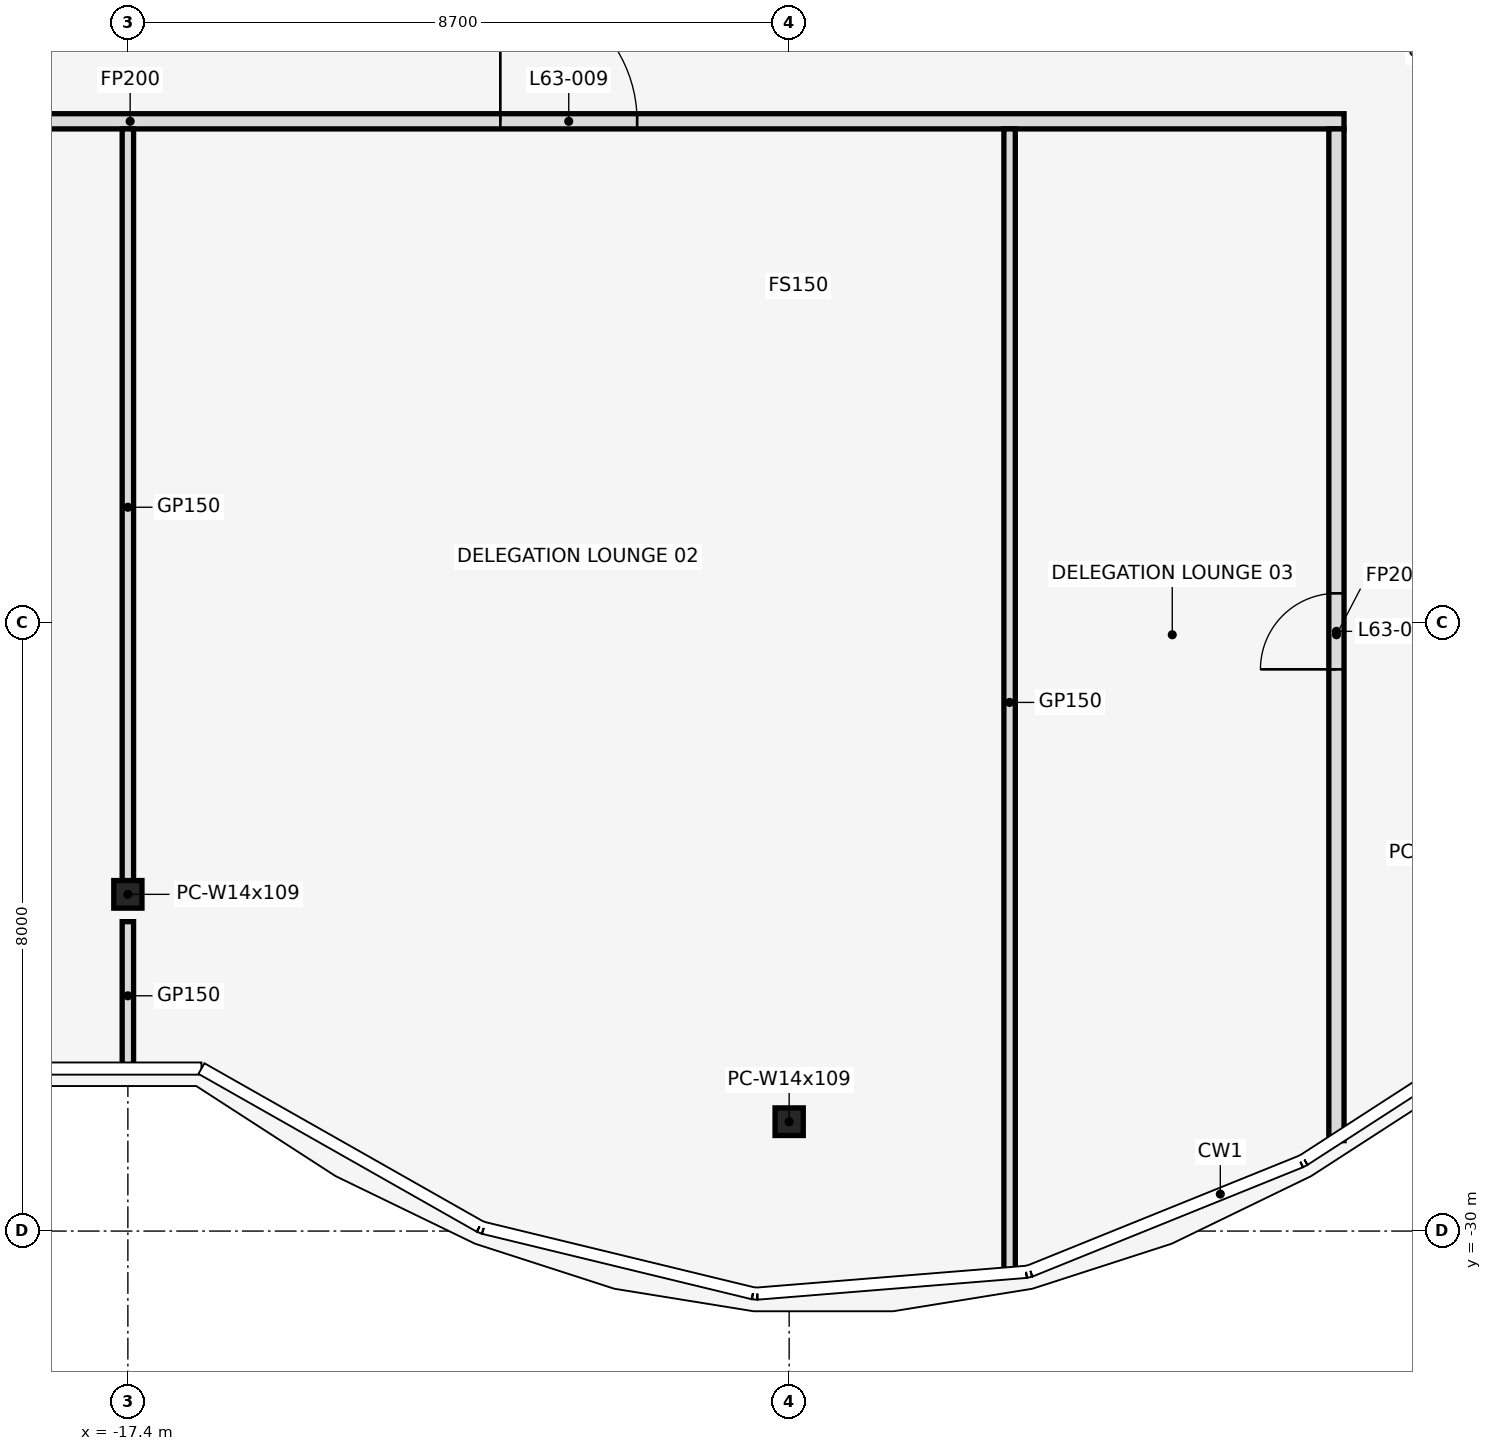
"""IFC4 building model, lengths in metres.
Left out: names, types, materials, properties, quantities, classifications, styles, units other than length and angle.
Written with IfcOpenShell. Run it as: python <this file> out.ifc"""

import sys

from ifc_helpers import new_model, si_unit, direction, frame, frame_2d, origin, origin_2d, place, context, subcontext, project, spatial, rectangle, i_section, extrude, element, fill, save


model = new_model("IFC4")
c1 = context("Model", 3, precision=1e-05, world=origin(), true_north=direction((0.0, 1.0)))
c2 = subcontext(c1, "Body", "Model", "MODEL_VIEW")
j1 = project(units=[si_unit("LENGTHUNIT", "METRE"), si_unit("PLANEANGLEUNIT", "RADIAN")], contexts=[c1])
p1 = place(None, origin())
s1 = spatial("IfcSite", under=j1, at=p1, CompositionType="ELEMENT")
p2 = place(p1, origin())
s2 = spatial("IfcBuilding", under=s1, at=p2, CompositionType="ELEMENT")
p3 = place(p2, frame((0.0, 0.0, 279.2)))
s3 = spatial("IfcBuildingStorey", under=s2, at=p3, CompositionType="ELEMENT", Elevation=279.2)
for number, where, z_axis, x_axis in (
    (1, (-17.4, -25.57, 0.0), (0.0, 0.0, 1.0), (1.0, 0.0, 0.0)),
    (2, (-8.7, -28.561, 0.0), (0.0, 0.0, 1.0), (1.0, 0.0, 0.0)),
):
    element("IfcColumn", number, at=place(p3, frame(where, z_axis=z_axis, x_axis=x_axis)), inside=s3, PredefinedType="COLUMN", context=c2, shape_type="SweptSolid", body=[
        extrude(i_section(OverallWidth=0.371, OverallDepth=0.363, WebThickness=0.013, FlangeThickness=0.022, at=origin_2d()), origin(), (0.0, 0.0, 1.0), 4.2),
    ])
p4 = place(p3, frame((-33.34, -15.4, 0.0), z_axis=(0.0, 0.0, 1.0), x_axis=(1.0, 0.0, 0.0)))
e3 = element("IfcWall", 3, at=p4, inside=s3, PredefinedType="PARTITIONING", context=c2, shape_type="SweptSolid", body=[
    extrude(rectangle(XDim=31.94, YDim=0.2, at=frame_2d((15.97, 0.0))), origin(), (0.0, 0.0, 1.0), 3.04),
])
p5 = place(p4, frame((4.2, 0.0, 0.0)))
e4 = element("IfcOpeningElement", 4, at=p5, cuts=e3, PredefinedType="OPENING", context=c2, shape_type="SweptSolid", body=[
    extrude(rectangle(XDim=1.8, YDim=2.1, at=frame_2d((0.9, 1.05))), frame((0.0, 0.112, 0.0), z_axis=(0.0, -1.0, 0.0), x_axis=(1.0, 0.0, 0.0)), (0.0, 0.0, 1.0), 0.224),
])
p6 = place(p4, frame((12.54, 0.0, 0.0)))
e5 = element("IfcOpeningElement", 5, at=p6, cuts=e3, PredefinedType="OPENING", context=c2, shape_type="SweptSolid", body=[
    extrude(rectangle(XDim=1.0, YDim=2.1, at=frame_2d((0.5, 1.05))), frame((0.0, 0.112, 0.0), z_axis=(0.0, -1.0, 0.0), x_axis=(1.0, 0.0, 0.0)), (0.0, 0.0, 1.0), 0.224),
])
p7 = place(p4, frame((20.84, 0.0, 0.0)))
e6 = element("IfcOpeningElement", 6, at=p7, cuts=e3, PredefinedType="OPENING", context=c2, shape_type="SweptSolid", body=[
    extrude(rectangle(XDim=1.8, YDim=2.1, at=frame_2d((0.9, 1.05))), frame((0.0, 0.112, 0.0), z_axis=(0.0, -1.0, 0.0), x_axis=(1.0, 0.0, 0.0)), (0.0, 0.0, 1.0), 0.224),
])
p8 = place(p3, frame((-17.4, -27.88, 0.0), z_axis=(0.0, 0.0, 1.0), x_axis=(0.0, 1.0, 0.0)))
e7 = element("IfcWall", 7, at=p8, inside=s3, PredefinedType="PARTITIONING", context=c2, shape_type="SweptSolid", body=[
    extrude(rectangle(XDim=1.951, YDim=0.15, at=frame_2d((0.975, 0.0))), origin(), (0.0, 0.0, 1.0), 3.04),
])
p9 = place(p3, frame((-17.4, -25.455, 0.0), z_axis=(0.0, 0.0, 1.0), x_axis=(0.0, 1.0, 0.0)))
e8 = element("IfcWall", 8, at=p9, inside=s3, PredefinedType="PARTITIONING", context=c2, shape_type="SweptSolid", body=[
    extrude(rectangle(XDim=9.955, YDim=0.15, at=frame_2d((4.977, 0.0))), origin(), (0.0, 0.0, 1.0), 3.04),
])
p10 = place(p3, frame((-5.8, -30.59, 0.0), z_axis=(0.0, 0.0, 1.0), x_axis=(0.0, 1.0, 0.0)))
e9 = element("IfcWall", 9, at=p10, inside=s3, PredefinedType="PARTITIONING", context=c2, shape_type="SweptSolid", body=[
    extrude(rectangle(XDim=15.09, YDim=0.15, at=frame_2d((7.545, 0.0))), origin(), (0.0, 0.0, 1.0), 3.04),
])
p11 = place(p3, frame((-1.5, -28.81, 0.0), z_axis=(0.0, 0.0, 1.0), x_axis=(0.0, 1.0, 0.0)))
e10 = element("IfcWall", 10, at=p11, inside=s3, PredefinedType="PARTITIONING", context=c2, shape_type="SweptSolid", body=[
    extrude(rectangle(XDim=13.31, YDim=0.2, at=frame_2d((6.655, 0.0))), origin(), (0.0, 0.0, 1.0), 3.04),
])
p12 = place(p11, frame((6.2, 0.0, 0.0)))
e11 = element("IfcOpeningElement", 11, at=p12, cuts=e10, PredefinedType="OPENING", context=c2, shape_type="SweptSolid", body=[
    extrude(rectangle(XDim=1.0, YDim=2.1, at=frame_2d((0.5, 1.05))), frame((0.0, 0.112, 0.0), z_axis=(0.0, -1.0, 0.0), x_axis=(1.0, 0.0, 0.0)), (0.0, 0.0, 1.0), 0.224),
])
p13 = place(p7, origin())
e12 = element("IfcDoor", 12, at=p13, inside=s3, OperationType="SINGLE_SWING_LEFT", PredefinedType="DOOR", context=c2, shape_type="SweptSolid", body=[
    extrude(rectangle(XDim=1.8, YDim=2.1, at=frame_2d((0.9, 1.05))), frame((0.0, 0.025, 0.0), z_axis=(0.0, -1.0, 0.0), x_axis=(1.0, 0.0, 0.0)), (0.0, 0.0, 1.0), 0.05),
])
fill(e6, e12)
p14 = place(p12, origin())
e13 = element("IfcDoor", 13, at=p14, inside=s3, OperationType="SINGLE_SWING_LEFT", PredefinedType="DOOR", context=c2, shape_type="SweptSolid", body=[
    extrude(rectangle(XDim=1.0, YDim=2.1, at=frame_2d((0.5, 1.05))), frame((0.0, 0.025, 0.0), z_axis=(0.0, -1.0, 0.0), x_axis=(1.0, 0.0, 0.0)), (0.0, 0.0, 1.0), 0.05),
])
fill(e11, e13)
save(model, sys.argv[1])
